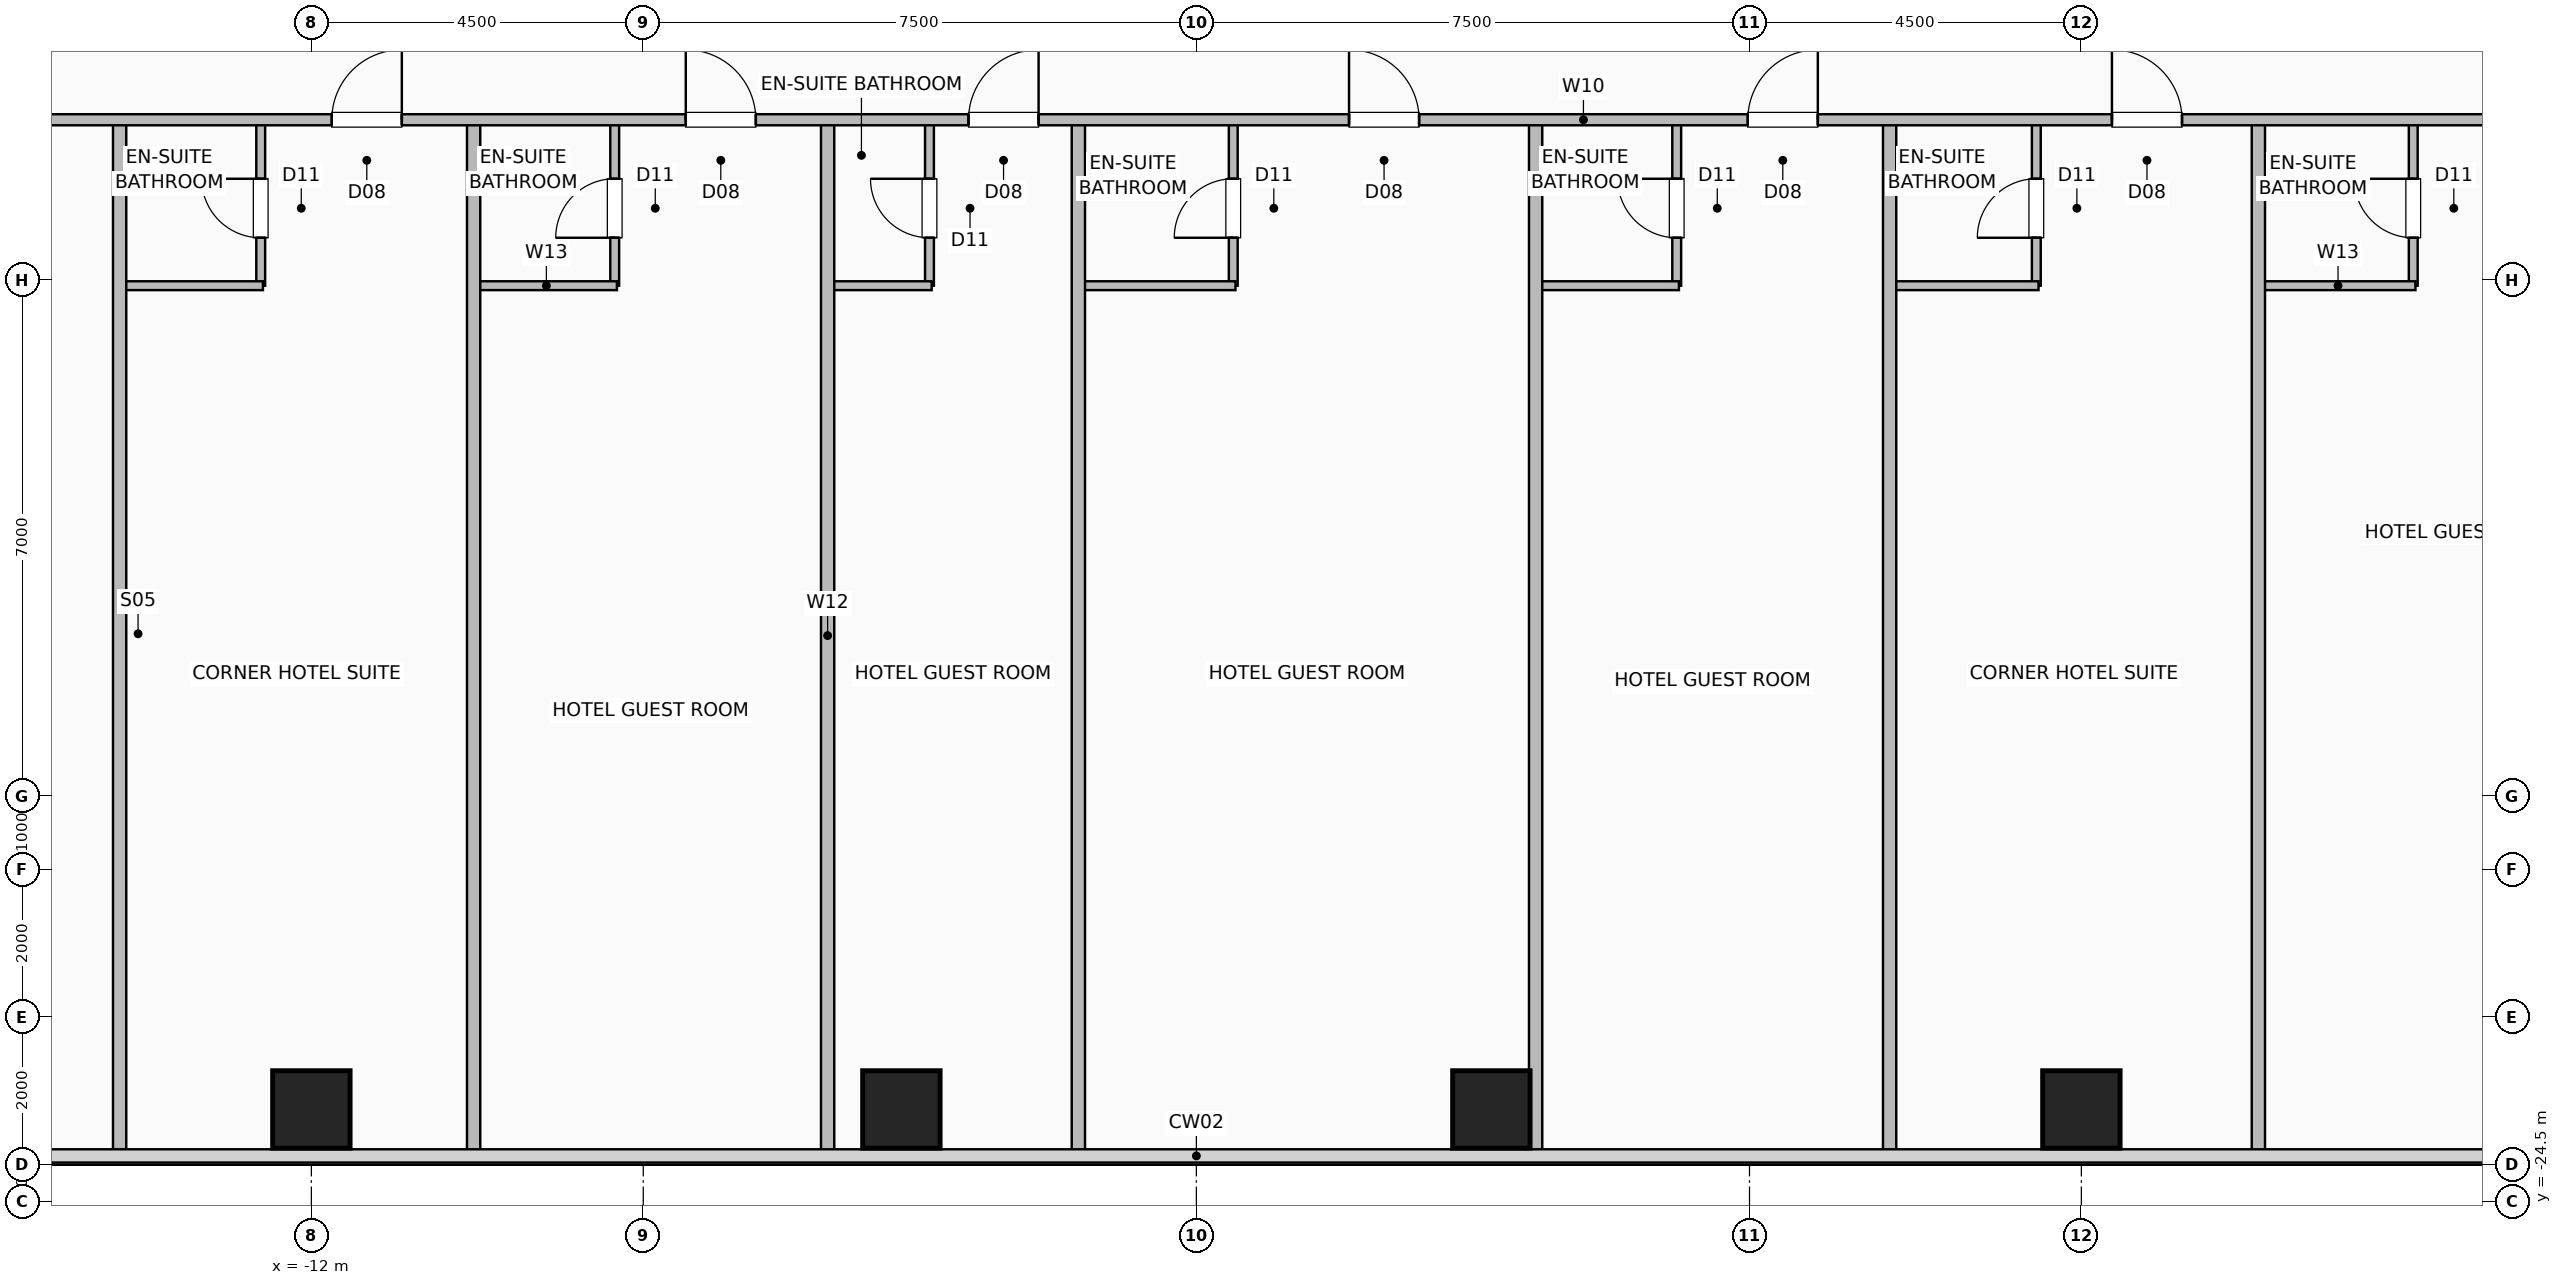
"""IFC4 building model, lengths in metres.
Left out: names, types, materials, properties, quantities, classifications, styles, units other than length and angle.
Written with IfcOpenShell. Run it as: python <this file> out.ifc"""

import sys

from ifc_helpers import new_model, si_unit, direction, frame, frame_2d, origin, origin_2d, place, context, subcontext, project, spatial, rectangle, hollow_rectangle, extrude, element, fill, save


model = new_model("IFC4")
c1 = context("Model", 3, precision=1e-05, world=origin(), true_north=direction((0.0, 1.0)))
c2 = subcontext(c1, "Body", "Model", "MODEL_VIEW")
j1 = project(units=[si_unit("LENGTHUNIT", "METRE"), si_unit("PLANEANGLEUNIT", "RADIAN")], contexts=[c1])
p1 = place(None, origin())
s1 = spatial("IfcSite", under=j1, at=p1, CompositionType="ELEMENT")
p2 = place(p1, origin())
s2 = spatial("IfcBuilding", under=s1, at=p2, CompositionType="ELEMENT")
p3 = place(p2, frame((0.0, 0.0, 62.0)))
s3 = spatial("IfcBuildingStorey", under=s2, at=p3, CompositionType="ELEMENT", Elevation=62.0)
for number, where, z_axis, x_axis in (
    (1, (-12.0, -23.25, 0.0), (0.0, 0.0, 1.0), (1.0, 0.0, 0.0)),
    (2, (-4.0, -23.25, 0.0), (0.0, 0.0, 1.0), (1.0, 0.0, 0.0)),
    (3, (4.0, -23.25, 0.0), (0.0, 0.0, 1.0), (1.0, 0.0, 0.0)),
    (4, (12.0, -23.25, 0.0), (0.0, 0.0, 1.0), (1.0, 0.0, 0.0)),
):
    element("IfcColumn", number, at=place(p3, frame(where, z_axis=z_axis, x_axis=x_axis)), inside=s3, PredefinedType="COLUMN", context=c2, shape_type="SweptSolid", body=[
        extrude(hollow_rectangle(XDim=1.05, YDim=1.05, WallThickness=0.05, at=origin_2d()), origin(), (0.0, 0.0, 1.0), 3.5),
    ])
p4 = place(p3, frame((-12.687, -12.08, 0.0), z_axis=(0.0, 0.0, 1.0), x_axis=(0.0, 1.0, 0.0)))
e5 = element("IfcWall", 5, at=p4, inside=s3, PredefinedType="PLUMBINGWALL", context=c2, shape_type="SweptSolid", body=[
    extrude(rectangle(XDim=2.25, YDim=0.12, at=frame_2d((1.125, 0.0))), origin(), (0.0, 0.0, 1.0), 3.25),
])
p5 = place(p4, frame((0.65, 0.0, 0.0)))
e6 = element("IfcOpeningElement", 6, at=p5, cuts=e5, PredefinedType="OPENING", context=c2, shape_type="SweptSolid", body=[
    extrude(rectangle(XDim=0.8, YDim=2.05, at=frame_2d((0.4, 1.025))), frame((0.0, 0.07, 0.0), z_axis=(0.0, -1.0, 0.0), x_axis=(1.0, 0.0, 0.0)), (0.0, 0.0, 1.0), 0.14),
])
p6 = place(p3, frame((-14.57, -12.08, 0.0), z_axis=(0.0, 0.0, 1.0), x_axis=(1.0, 0.0, 0.0)))
e7 = element("IfcWall", 7, at=p6, inside=s3, PredefinedType="PLUMBINGWALL", context=c2, shape_type="SweptSolid", body=[
    extrude(rectangle(XDim=1.913, YDim=0.12, at=frame_2d((0.957, 0.0))), origin(), (0.0, 0.0, 1.0), 3.25),
])
p7 = place(p3, frame((-7.887, -12.08, 0.0), z_axis=(0.0, 0.0, 1.0), x_axis=(0.0, 1.0, 0.0)))
e8 = element("IfcWall", 8, at=p7, inside=s3, PredefinedType="PLUMBINGWALL", context=c2, shape_type="SweptSolid", body=[
    extrude(rectangle(XDim=2.25, YDim=0.12, at=frame_2d((1.125, 0.0))), origin(), (0.0, 0.0, 1.0), 3.25),
])
p8 = place(p7, frame((0.65, 0.0, 0.0)))
e9 = element("IfcOpeningElement", 9, at=p8, cuts=e8, PredefinedType="OPENING", context=c2, shape_type="SweptSolid", body=[
    extrude(rectangle(XDim=0.8, YDim=2.05, at=frame_2d((0.4, 1.025))), frame((0.0, 0.07, 0.0), z_axis=(0.0, -1.0, 0.0), x_axis=(1.0, 0.0, 0.0)), (0.0, 0.0, 1.0), 0.14),
])
p9 = place(p3, frame((-9.77, -12.08, 0.0), z_axis=(0.0, 0.0, 1.0), x_axis=(1.0, 0.0, 0.0)))
e10 = element("IfcWall", 10, at=p9, inside=s3, PredefinedType="PLUMBINGWALL", context=c2, shape_type="SweptSolid", body=[
    extrude(rectangle(XDim=1.913, YDim=0.12, at=frame_2d((0.957, 0.0))), origin(), (0.0, 0.0, 1.0), 3.25),
])
p10 = place(p3, frame((-3.619, -12.08, 0.0), z_axis=(0.0, 0.0, 1.0), x_axis=(0.0, 1.0, 0.0)))
e11 = element("IfcWall", 11, at=p10, inside=s3, PredefinedType="PLUMBINGWALL", context=c2, shape_type="SweptSolid", body=[
    extrude(rectangle(XDim=2.25, YDim=0.12, at=frame_2d((1.125, 0.0))), origin(), (0.0, 0.0, 1.0), 3.25),
])
p11 = place(p10, frame((0.65, 0.0, 0.0)))
e12 = element("IfcOpeningElement", 12, at=p11, cuts=e11, PredefinedType="OPENING", context=c2, shape_type="SweptSolid", body=[
    extrude(rectangle(XDim=0.8, YDim=2.05, at=frame_2d((0.4, 1.025))), frame((0.0, 0.07, 0.0), z_axis=(0.0, -1.0, 0.0), x_axis=(1.0, 0.0, 0.0)), (0.0, 0.0, 1.0), 0.14),
])
p12 = place(p3, frame((-4.97, -12.08, 0.0), z_axis=(0.0, 0.0, 1.0), x_axis=(1.0, 0.0, 0.0)))
e13 = element("IfcWall", 13, at=p12, inside=s3, PredefinedType="PLUMBINGWALL", context=c2, shape_type="SweptSolid", body=[
    extrude(rectangle(XDim=1.381, YDim=0.12, at=frame_2d((0.69, 0.0))), origin(), (0.0, 0.0, 1.0), 3.25),
])
p13 = place(p3, frame((0.5, -12.08, 0.0), z_axis=(0.0, 0.0, 1.0), x_axis=(0.0, 1.0, 0.0)))
e14 = element("IfcWall", 14, at=p13, inside=s3, PredefinedType="PLUMBINGWALL", context=c2, shape_type="SweptSolid", body=[
    extrude(rectangle(XDim=2.25, YDim=0.12, at=frame_2d((1.125, 0.0))), origin(), (0.0, 0.0, 1.0), 3.25),
])
p14 = place(p13, frame((0.65, 0.0, 0.0)))
e15 = element("IfcOpeningElement", 15, at=p14, cuts=e14, PredefinedType="OPENING", context=c2, shape_type="SweptSolid", body=[
    extrude(rectangle(XDim=0.8, YDim=2.05, at=frame_2d((0.4, 1.025))), frame((0.0, 0.07, 0.0), z_axis=(0.0, -1.0, 0.0), x_axis=(1.0, 0.0, 0.0)), (0.0, 0.0, 1.0), 0.14),
])
p15 = place(p3, frame((-1.57, -12.08, 0.0), z_axis=(0.0, 0.0, 1.0), x_axis=(1.0, 0.0, 0.0)))
e16 = element("IfcWall", 16, at=p15, inside=s3, PredefinedType="PLUMBINGWALL", context=c2, shape_type="SweptSolid", body=[
    extrude(rectangle(XDim=2.1, YDim=0.12, at=frame_2d((1.05, 0.0))), origin(), (0.0, 0.0, 1.0), 3.25),
])
p16 = place(p3, frame((6.513, -12.08, 0.0), z_axis=(0.0, 0.0, 1.0), x_axis=(0.0, 1.0, 0.0)))
e17 = element("IfcWall", 17, at=p16, inside=s3, PredefinedType="PLUMBINGWALL", context=c2, shape_type="SweptSolid", body=[
    extrude(rectangle(XDim=2.25, YDim=0.12, at=frame_2d((1.125, 0.0))), origin(), (0.0, 0.0, 1.0), 3.25),
])
p17 = place(p16, frame((0.65, 0.0, 0.0)))
e18 = element("IfcOpeningElement", 18, at=p17, cuts=e17, PredefinedType="OPENING", context=c2, shape_type="SweptSolid", body=[
    extrude(rectangle(XDim=0.8, YDim=2.05, at=frame_2d((0.4, 1.025))), frame((0.0, 0.07, 0.0), z_axis=(0.0, -1.0, 0.0), x_axis=(1.0, 0.0, 0.0)), (0.0, 0.0, 1.0), 0.14),
])
p18 = place(p3, frame((4.63, -12.08, 0.0), z_axis=(0.0, 0.0, 1.0), x_axis=(1.0, 0.0, 0.0)))
e19 = element("IfcWall", 19, at=p18, inside=s3, PredefinedType="PLUMBINGWALL", context=c2, shape_type="SweptSolid", body=[
    extrude(rectangle(XDim=1.913, YDim=0.12, at=frame_2d((0.957, 0.0))), origin(), (0.0, 0.0, 1.0), 3.25),
])
p19 = place(p3, frame((11.389, -12.08, 0.0), z_axis=(0.0, 0.0, 1.0), x_axis=(0.0, 1.0, 0.0)))
e20 = element("IfcWall", 20, at=p19, inside=s3, PredefinedType="PLUMBINGWALL", context=c2, shape_type="SweptSolid", body=[
    extrude(rectangle(XDim=2.25, YDim=0.12, at=frame_2d((1.125, 0.0))), origin(), (0.0, 0.0, 1.0), 3.25),
])
p20 = place(p19, frame((0.65, 0.0, 0.0)))
e21 = element("IfcOpeningElement", 21, at=p20, cuts=e20, PredefinedType="OPENING", context=c2, shape_type="SweptSolid", body=[
    extrude(rectangle(XDim=0.8, YDim=2.05, at=frame_2d((0.4, 1.025))), frame((0.0, 0.07, 0.0), z_axis=(0.0, -1.0, 0.0), x_axis=(1.0, 0.0, 0.0)), (0.0, 0.0, 1.0), 0.14),
])
p21 = place(p3, frame((9.43, -12.08, 0.0), z_axis=(0.0, 0.0, 1.0), x_axis=(1.0, 0.0, 0.0)))
e22 = element("IfcWall", 22, at=p21, inside=s3, PredefinedType="PLUMBINGWALL", context=c2, shape_type="SweptSolid", body=[
    extrude(rectangle(XDim=1.989, YDim=0.12, at=frame_2d((0.995, 0.0))), origin(), (0.0, 0.0, 1.0), 3.25),
])
p22 = place(p3, frame((16.5, -12.08, 0.0), z_axis=(0.0, 0.0, 1.0), x_axis=(0.0, 1.0, 0.0)))
e23 = element("IfcWall", 23, at=p22, inside=s3, PredefinedType="PLUMBINGWALL", context=c2, shape_type="SweptSolid", body=[
    extrude(rectangle(XDim=2.25, YDim=0.12, at=frame_2d((1.125, 0.0))), origin(), (0.0, 0.0, 1.0), 3.25),
])
p23 = place(p22, frame((0.65, 0.0, 0.0)))
e24 = element("IfcOpeningElement", 24, at=p23, cuts=e23, PredefinedType="OPENING", context=c2, shape_type="SweptSolid", body=[
    extrude(rectangle(XDim=0.8, YDim=2.05, at=frame_2d((0.4, 1.025))), frame((0.0, 0.07, 0.0), z_axis=(0.0, -1.0, 0.0), x_axis=(1.0, 0.0, 0.0)), (0.0, 0.0, 1.0), 0.14),
])
p24 = place(p3, frame((14.43, -12.08, 0.0), z_axis=(0.0, 0.0, 1.0), x_axis=(1.0, 0.0, 0.0)))
e25 = element("IfcWall", 25, at=p24, inside=s3, PredefinedType="PLUMBINGWALL", context=c2, shape_type="SweptSolid", body=[
    extrude(rectangle(XDim=2.1, YDim=0.12, at=frame_2d((1.05, 0.0))), origin(), (0.0, 0.0, 1.0), 3.25),
])
for number, where, z_axis, x_axis in (
    (26, (-14.6, -23.82, 0.0), (0.0, 0.0, 1.0), (0.0, 1.0, 0.0)),
    (27, (-9.8, -23.82, 0.0), (0.0, 0.0, 1.0), (0.0, 1.0, 0.0)),
    (28, (-5.0, -23.82, 0.0), (0.0, 0.0, 1.0), (0.0, 1.0, 0.0)),
    (29, (-1.6, -23.82, 0.0), (0.0, 0.0, 1.0), (0.0, 1.0, 0.0)),
    (30, (4.6, -23.82, 0.0), (0.0, 0.0, 1.0), (0.0, 1.0, 0.0)),
    (31, (9.4, -23.82, 0.0), (0.0, 0.0, 1.0), (0.0, 1.0, 0.0)),
    (32, (14.4, -23.82, 0.0), (0.0, 0.0, 1.0), (0.0, 1.0, 0.0)),
):
    element("IfcWall", number, at=place(p3, frame(where, z_axis=z_axis, x_axis=x_axis)), inside=s3, PredefinedType="PARTITIONING", context=c2, shape_type="SweptSolid", body=[
        extrude(rectangle(XDim=13.99, YDim=0.18, at=frame_2d((6.995, 0.0))), origin(), (0.0, 0.0, 1.0), 3.25),
    ])
p25 = place(p3, frame((-19.95, -9.83, 0.0), z_axis=(0.0, 0.0, 1.0), x_axis=(1.0, 0.0, 0.0)))
e33 = element("IfcWall", 33, at=p25, inside=s3, PredefinedType="PARTITIONING", context=c2, shape_type="SweptSolid", body=[
    extrude(rectangle(XDim=39.9, YDim=0.15, at=frame_2d((19.95, 0.0))), origin(), (0.0, 0.0, 1.0), 3.25),
])
p26 = place(p25, frame((3.245, 0.0, 0.0)))
e34 = element("IfcOpeningElement", 34, at=p26, cuts=e33, PredefinedType="OPENING", context=c2, shape_type="SweptSolid", body=[
    extrude(rectangle(XDim=0.95, YDim=2.08, at=frame_2d((0.475, 1.04))), frame((0.0, 0.085, 0.0), z_axis=(0.0, -1.0, 0.0), x_axis=(1.0, 0.0, 0.0)), (0.0, 0.0, 1.0), 0.17),
])
p27 = place(p25, frame((8.227, 0.0, 0.0)))
e35 = element("IfcOpeningElement", 35, at=p27, cuts=e33, PredefinedType="OPENING", context=c2, shape_type="SweptSolid", body=[
    extrude(rectangle(XDim=0.95, YDim=2.08, at=frame_2d((0.475, 1.04))), frame((0.0, 0.085, 0.0), z_axis=(0.0, -1.0, 0.0), x_axis=(1.0, 0.0, 0.0)), (0.0, 0.0, 1.0), 0.17),
])
p28 = place(p25, frame((13.027, 0.0, 0.0)))
e36 = element("IfcOpeningElement", 36, at=p28, cuts=e33, PredefinedType="OPENING", context=c2, shape_type="SweptSolid", body=[
    extrude(rectangle(XDim=0.95, YDim=2.08, at=frame_2d((0.475, 1.04))), frame((0.0, 0.085, 0.0), z_axis=(0.0, -1.0, 0.0), x_axis=(1.0, 0.0, 0.0)), (0.0, 0.0, 1.0), 0.17),
])
p29 = place(p25, frame((16.861, 0.0, 0.0)))
e37 = element("IfcOpeningElement", 37, at=p29, cuts=e33, PredefinedType="OPENING", context=c2, shape_type="SweptSolid", body=[
    extrude(rectangle(XDim=0.95, YDim=2.08, at=frame_2d((0.475, 1.04))), frame((0.0, 0.085, 0.0), z_axis=(0.0, -1.0, 0.0), x_axis=(1.0, 0.0, 0.0)), (0.0, 0.0, 1.0), 0.17),
])
p30 = place(p25, frame((22.02, 0.0, 0.0)))
e38 = element("IfcOpeningElement", 38, at=p30, cuts=e33, PredefinedType="OPENING", context=c2, shape_type="SweptSolid", body=[
    extrude(rectangle(XDim=0.95, YDim=2.08, at=frame_2d((0.475, 1.04))), frame((0.0, 0.085, 0.0), z_axis=(0.0, -1.0, 0.0), x_axis=(1.0, 0.0, 0.0)), (0.0, 0.0, 1.0), 0.17),
])
p31 = place(p25, frame((27.427, 0.0, 0.0)))
e39 = element("IfcOpeningElement", 39, at=p31, cuts=e33, PredefinedType="OPENING", context=c2, shape_type="SweptSolid", body=[
    extrude(rectangle(XDim=0.95, YDim=2.08, at=frame_2d((0.475, 1.04))), frame((0.0, 0.085, 0.0), z_axis=(0.0, -1.0, 0.0), x_axis=(1.0, 0.0, 0.0)), (0.0, 0.0, 1.0), 0.17),
])
p32 = place(p25, frame((32.365, 0.0, 0.0)))
e40 = element("IfcOpeningElement", 40, at=p32, cuts=e33, PredefinedType="OPENING", context=c2, shape_type="SweptSolid", body=[
    extrude(rectangle(XDim=0.95, YDim=2.08, at=frame_2d((0.475, 1.04))), frame((0.0, 0.085, 0.0), z_axis=(0.0, -1.0, 0.0), x_axis=(1.0, 0.0, 0.0)), (0.0, 0.0, 1.0), 0.17),
])
p33 = place(p25, frame((37.695, 0.0, 0.0)))
e41 = element("IfcOpeningElement", 41, at=p33, cuts=e33, PredefinedType="OPENING", context=c2, shape_type="SweptSolid", body=[
    extrude(rectangle(XDim=0.95, YDim=2.08, at=frame_2d((0.475, 1.04))), frame((0.0, 0.085, 0.0), z_axis=(0.0, -1.0, 0.0), x_axis=(1.0, 0.0, 0.0)), (0.0, 0.0, 1.0), 0.17),
])
p34 = place(p5, origin())
e42 = element("IfcDoor", 42, at=p34, inside=s3, OperationType="SINGLE_SWING_RIGHT", PredefinedType="DOOR", context=c2, shape_type="SweptSolid", body=[
    extrude(rectangle(XDim=0.8, YDim=2.05, at=frame_2d((0.4, 1.025))), frame((0.0, 0.025, 0.0), z_axis=(0.0, -1.0, 0.0), x_axis=(1.0, 0.0, 0.0)), (0.0, 0.0, 1.0), 0.05),
])
fill(e6, e42)
p35 = place(p8, origin())
e43 = element("IfcDoor", 43, at=p35, inside=s3, OperationType="SINGLE_SWING_LEFT", PredefinedType="DOOR", context=c2, shape_type="SweptSolid", body=[
    extrude(rectangle(XDim=0.8, YDim=2.05, at=frame_2d((0.4, 1.025))), frame((0.0, 0.025, 0.0), z_axis=(0.0, -1.0, 0.0), x_axis=(1.0, 0.0, 0.0)), (0.0, 0.0, 1.0), 0.05),
])
fill(e9, e43)
p36 = place(p11, origin())
e44 = element("IfcDoor", 44, at=p36, inside=s3, OperationType="SINGLE_SWING_RIGHT", PredefinedType="DOOR", context=c2, shape_type="SweptSolid", body=[
    extrude(rectangle(XDim=0.8, YDim=2.05, at=frame_2d((0.4, 1.025))), frame((0.0, 0.025, 0.0), z_axis=(0.0, -1.0, 0.0), x_axis=(1.0, 0.0, 0.0)), (0.0, 0.0, 1.0), 0.05),
])
fill(e12, e44)
p37 = place(p14, origin())
e45 = element("IfcDoor", 45, at=p37, inside=s3, OperationType="SINGLE_SWING_LEFT", PredefinedType="DOOR", context=c2, shape_type="SweptSolid", body=[
    extrude(rectangle(XDim=0.8, YDim=2.05, at=frame_2d((0.4, 1.025))), frame((0.0, 0.025, 0.0), z_axis=(0.0, -1.0, 0.0), x_axis=(1.0, 0.0, 0.0)), (0.0, 0.0, 1.0), 0.05),
])
fill(e15, e45)
p38 = place(p17, origin())
e46 = element("IfcDoor", 46, at=p38, inside=s3, OperationType="SINGLE_SWING_RIGHT", PredefinedType="DOOR", context=c2, shape_type="SweptSolid", body=[
    extrude(rectangle(XDim=0.8, YDim=2.05, at=frame_2d((0.4, 1.025))), frame((0.0, 0.025, 0.0), z_axis=(0.0, -1.0, 0.0), x_axis=(1.0, 0.0, 0.0)), (0.0, 0.0, 1.0), 0.05),
])
fill(e18, e46)
p39 = place(p20, origin())
e47 = element("IfcDoor", 47, at=p39, inside=s3, OperationType="SINGLE_SWING_LEFT", PredefinedType="DOOR", context=c2, shape_type="SweptSolid", body=[
    extrude(rectangle(XDim=0.8, YDim=2.05, at=frame_2d((0.4, 1.025))), frame((0.0, 0.025, 0.0), z_axis=(0.0, -1.0, 0.0), x_axis=(1.0, 0.0, 0.0)), (0.0, 0.0, 1.0), 0.05),
])
fill(e21, e47)
p40 = place(p23, origin())
e48 = element("IfcDoor", 48, at=p40, inside=s3, OperationType="SINGLE_SWING_RIGHT", PredefinedType="DOOR", context=c2, shape_type="SweptSolid", body=[
    extrude(rectangle(XDim=0.8, YDim=2.05, at=frame_2d((0.4, 1.025))), frame((0.0, 0.025, 0.0), z_axis=(0.0, -1.0, 0.0), x_axis=(1.0, 0.0, 0.0)), (0.0, 0.0, 1.0), 0.05),
])
fill(e24, e48)
p41 = place(p27, origin())
e49 = element("IfcDoor", 49, at=p41, inside=s3, OperationType="SINGLE_SWING_RIGHT", PredefinedType="DOOR", context=c2, shape_type="SweptSolid", body=[
    extrude(rectangle(XDim=0.95, YDim=2.08, at=frame_2d((0.475, 1.04))), frame((0.0, 0.025, 0.0), z_axis=(0.0, -1.0, 0.0), x_axis=(1.0, 0.0, 0.0)), (0.0, 0.0, 1.0), 0.05),
])
fill(e35, e49)
p42 = place(p28, origin())
e50 = element("IfcDoor", 50, at=p42, inside=s3, OperationType="SINGLE_SWING_LEFT", PredefinedType="DOOR", context=c2, shape_type="SweptSolid", body=[
    extrude(rectangle(XDim=0.95, YDim=2.08, at=frame_2d((0.475, 1.04))), frame((0.0, 0.025, 0.0), z_axis=(0.0, -1.0, 0.0), x_axis=(1.0, 0.0, 0.0)), (0.0, 0.0, 1.0), 0.05),
])
fill(e36, e50)
p43 = place(p29, origin())
e51 = element("IfcDoor", 51, at=p43, inside=s3, OperationType="SINGLE_SWING_RIGHT", PredefinedType="DOOR", context=c2, shape_type="SweptSolid", body=[
    extrude(rectangle(XDim=0.95, YDim=2.08, at=frame_2d((0.475, 1.04))), frame((0.0, 0.025, 0.0), z_axis=(0.0, -1.0, 0.0), x_axis=(1.0, 0.0, 0.0)), (0.0, 0.0, 1.0), 0.05),
])
fill(e37, e51)
p44 = place(p30, origin())
e52 = element("IfcDoor", 52, at=p44, inside=s3, OperationType="SINGLE_SWING_LEFT", PredefinedType="DOOR", context=c2, shape_type="SweptSolid", body=[
    extrude(rectangle(XDim=0.95, YDim=2.08, at=frame_2d((0.475, 1.04))), frame((0.0, 0.025, 0.0), z_axis=(0.0, -1.0, 0.0), x_axis=(1.0, 0.0, 0.0)), (0.0, 0.0, 1.0), 0.05),
])
fill(e38, e52)
p45 = place(p31, origin())
e53 = element("IfcDoor", 53, at=p45, inside=s3, OperationType="SINGLE_SWING_RIGHT", PredefinedType="DOOR", context=c2, shape_type="SweptSolid", body=[
    extrude(rectangle(XDim=0.95, YDim=2.08, at=frame_2d((0.475, 1.04))), frame((0.0, 0.025, 0.0), z_axis=(0.0, -1.0, 0.0), x_axis=(1.0, 0.0, 0.0)), (0.0, 0.0, 1.0), 0.05),
])
fill(e39, e53)
p46 = place(p32, origin())
e54 = element("IfcDoor", 54, at=p46, inside=s3, OperationType="SINGLE_SWING_LEFT", PredefinedType="DOOR", context=c2, shape_type="SweptSolid", body=[
    extrude(rectangle(XDim=0.95, YDim=2.08, at=frame_2d((0.475, 1.04))), frame((0.0, 0.025, 0.0), z_axis=(0.0, -1.0, 0.0), x_axis=(1.0, 0.0, 0.0)), (0.0, 0.0, 1.0), 0.05),
])
fill(e40, e54)
save(model, sys.argv[1])
